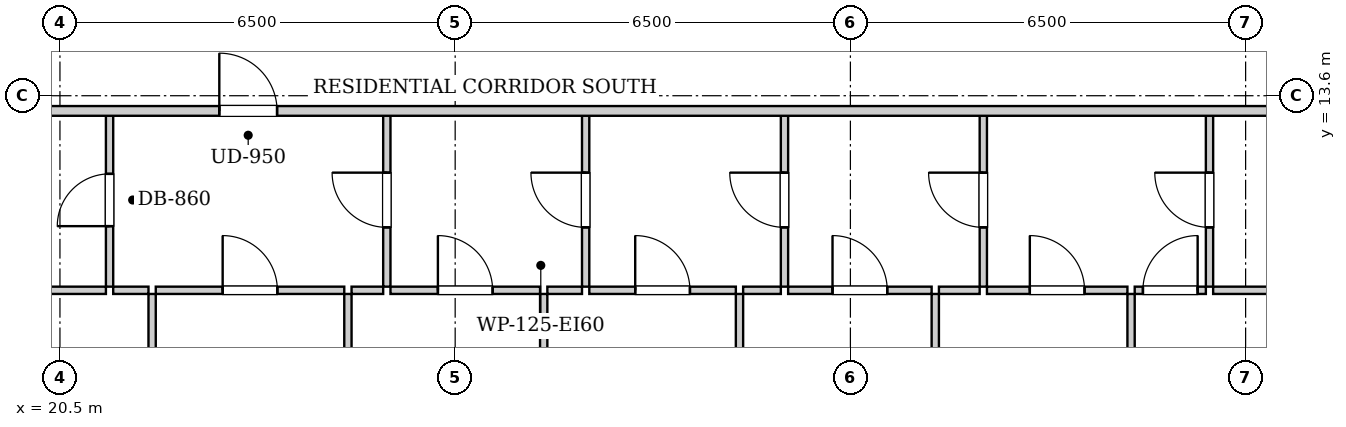
"""IFC4 building model, lengths in metres.
Left out: names, types, materials, properties, quantities, classifications, styles, units other than length and angle.
Written with IfcOpenShell. Run it as: python <this file> out.ifc"""

import sys

from ifc_helpers import new_model, si_unit, direction, frame, frame_2d, origin, place, context, subcontext, project, spatial, rectangle, extrude, element, fill, save


model = new_model("IFC4")
c1 = context("Model", 3, precision=1e-05, world=origin(), true_north=direction((0.0, 1.0)))
c2 = subcontext(c1, "Body", "Model", "MODEL_VIEW")
j1 = project(units=[si_unit("LENGTHUNIT", "METRE"), si_unit("PLANEANGLEUNIT", "RADIAN")], contexts=[c1])
p1 = place(None, origin())
s1 = spatial("IfcSite", under=j1, at=p1, CompositionType="ELEMENT")
p2 = place(p1, origin())
s2 = spatial("IfcBuilding", under=s1, at=p2, CompositionType="ELEMENT")
p3 = place(p2, frame((0.0, 0.0, 61.0)))
s3 = spatial("IfcBuildingStorey", under=s2, at=p3, CompositionType="ELEMENT", Elevation=61.0)
p4 = place(p3, frame((21.316, 10.46, 0.0), z_axis=(0.0, 0.0, 1.0), x_axis=(0.0, 1.0, 0.0)))
e1 = element("IfcWall", 1, at=p4, inside=s3, PredefinedType="PARTITIONING", context=c2, shape_type="SweptSolid", body=[
    extrude(rectangle(XDim=2.85, YDim=0.12, at=frame_2d((1.425, 0.0))), origin(), (0.0, 0.0, 1.0), 2.94),
])
p5 = place(p4, frame((0.995, 0.0, 0.0)))
e2 = element("IfcOpeningElement", 2, at=p5, cuts=e1, PredefinedType="OPENING", context=c2, shape_type="SweptSolid", body=[
    extrude(rectangle(XDim=0.86, YDim=2.05, at=frame_2d((0.43, 1.025))), frame((0.0, 0.07, 0.0), z_axis=(0.0, -1.0, 0.0), x_axis=(1.0, 0.0, 0.0)), (0.0, 0.0, 1.0), 0.14),
])
p6 = place(p3, frame((18.856, 10.4, 0.0), z_axis=(0.0, 0.0, 1.0), x_axis=(1.0, 0.0, 0.0)))
e3 = element("IfcWall", 3, at=p6, inside=s3, PredefinedType="PARTITIONING", context=c2, shape_type="SweptSolid", body=[
    extrude(rectangle(XDim=2.4, YDim=0.12, at=frame_2d((1.2, 0.0))), origin(), (0.0, 0.0, 1.0), 2.94),
])
p7 = place(p3, frame((25.876, 10.46, 0.0), z_axis=(0.0, 0.0, 1.0), x_axis=(0.0, 1.0, 0.0)))
e4 = element("IfcWall", 4, at=p7, inside=s3, PredefinedType="PARTITIONING", context=c2, shape_type="SweptSolid", body=[
    extrude(rectangle(XDim=2.85, YDim=0.12, at=frame_2d((1.425, 0.0))), origin(), (0.0, 0.0, 1.0), 2.94),
])
p8 = place(p7, frame((0.975, 0.0, 0.0)))
e5 = element("IfcOpeningElement", 5, at=p8, cuts=e4, PredefinedType="OPENING", context=c2, shape_type="SweptSolid", body=[
    extrude(rectangle(XDim=0.9, YDim=2.05, at=frame_2d((0.45, 1.025))), frame((0.0, 0.07, 0.0), z_axis=(0.0, -1.0, 0.0), x_axis=(1.0, 0.0, 0.0)), (0.0, 0.0, 1.0), 0.14),
])
p9 = place(p3, frame((21.376, 10.4, 0.0), z_axis=(0.0, 0.0, 1.0), x_axis=(1.0, 0.0, 0.0)))
e6 = element("IfcWall", 6, at=p9, inside=s3, PredefinedType="PARTITIONING", context=c2, shape_type="SweptSolid", body=[
    extrude(rectangle(XDim=0.58, YDim=0.12, at=frame_2d((0.29, 0.0))), origin(), (0.0, 0.0, 1.0), 2.94),
])
p10 = place(p3, frame((22.076, 10.4, 0.0), z_axis=(0.0, 0.0, 1.0), x_axis=(1.0, 0.0, 0.0)))
e7 = element("IfcWall", 7, at=p10, inside=s3, PredefinedType="PARTITIONING", context=c2, shape_type="SweptSolid", body=[
    extrude(rectangle(XDim=3.1, YDim=0.12, at=frame_2d((1.55, 0.0))), origin(), (0.0, 0.0, 1.0), 2.94),
])
p11 = place(p10, frame((1.1, 0.0, 0.0)))
e8 = element("IfcOpeningElement", 8, at=p11, cuts=e7, PredefinedType="OPENING", context=c2, shape_type="SweptSolid", body=[
    extrude(rectangle(XDim=0.9, YDim=2.05, at=frame_2d((0.45, 1.025))), frame((0.0, 0.07, 0.0), z_axis=(0.0, -1.0, 0.0), x_axis=(1.0, 0.0, 0.0)), (0.0, 0.0, 1.0), 0.14),
])
p12 = place(p3, frame((25.296, 10.4, 0.0), z_axis=(0.0, 0.0, 1.0), x_axis=(1.0, 0.0, 0.0)))
e9 = element("IfcWall", 9, at=p12, inside=s3, PredefinedType="PARTITIONING", context=c2, shape_type="SweptSolid", body=[
    extrude(rectangle(XDim=0.52, YDim=0.12, at=frame_2d((0.26, 0.0))), origin(), (0.0, 0.0, 1.0), 2.94),
])
p13 = place(p3, frame((29.146, 10.46, 0.0), z_axis=(0.0, 0.0, 1.0), x_axis=(0.0, 1.0, 0.0)))
e10 = element("IfcWall", 10, at=p13, inside=s3, PredefinedType="PARTITIONING", context=c2, shape_type="SweptSolid", body=[
    extrude(rectangle(XDim=2.85, YDim=0.12, at=frame_2d((1.425, 0.0))), origin(), (0.0, 0.0, 1.0), 2.94),
])
p14 = place(p13, frame((0.975, 0.0, 0.0)))
e11 = element("IfcOpeningElement", 11, at=p14, cuts=e10, PredefinedType="OPENING", context=c2, shape_type="SweptSolid", body=[
    extrude(rectangle(XDim=0.9, YDim=2.05, at=frame_2d((0.45, 1.025))), frame((0.0, 0.07, 0.0), z_axis=(0.0, -1.0, 0.0), x_axis=(1.0, 0.0, 0.0)), (0.0, 0.0, 1.0), 0.14),
])
p15 = place(p3, frame((25.936, 10.4, 0.0), z_axis=(0.0, 0.0, 1.0), x_axis=(1.0, 0.0, 0.0)))
e12 = element("IfcWall", 12, at=p15, inside=s3, PredefinedType="PARTITIONING", context=c2, shape_type="SweptSolid", body=[
    extrude(rectangle(XDim=2.46, YDim=0.12, at=frame_2d((1.23, 0.0))), origin(), (0.0, 0.0, 1.0), 2.94),
])
p16 = place(p15, frame((0.78, 0.0, 0.0)))
e13 = element("IfcOpeningElement", 13, at=p16, cuts=e12, PredefinedType="OPENING", context=c2, shape_type="SweptSolid", body=[
    extrude(rectangle(XDim=0.9, YDim=2.05, at=frame_2d((0.45, 1.025))), frame((0.0, 0.07, 0.0), z_axis=(0.0, -1.0, 0.0), x_axis=(1.0, 0.0, 0.0)), (0.0, 0.0, 1.0), 0.14),
])
p17 = place(p3, frame((28.516, 10.4, 0.0), z_axis=(0.0, 0.0, 1.0), x_axis=(1.0, 0.0, 0.0)))
e14 = element("IfcWall", 14, at=p17, inside=s3, PredefinedType="PARTITIONING", context=c2, shape_type="SweptSolid", body=[
    extrude(rectangle(XDim=0.57, YDim=0.12, at=frame_2d((0.285, 0.0))), origin(), (0.0, 0.0, 1.0), 2.94),
])
p18 = place(p3, frame((32.416, 10.46, 0.0), z_axis=(0.0, 0.0, 1.0), x_axis=(0.0, 1.0, 0.0)))
e15 = element("IfcWall", 15, at=p18, inside=s3, PredefinedType="PARTITIONING", context=c2, shape_type="SweptSolid", body=[
    extrude(rectangle(XDim=2.85, YDim=0.12, at=frame_2d((1.425, 0.0))), origin(), (0.0, 0.0, 1.0), 2.94),
])
p19 = place(p18, frame((0.975, 0.0, 0.0)))
e16 = element("IfcOpeningElement", 16, at=p19, cuts=e15, PredefinedType="OPENING", context=c2, shape_type="SweptSolid", body=[
    extrude(rectangle(XDim=0.9, YDim=2.05, at=frame_2d((0.45, 1.025))), frame((0.0, 0.07, 0.0), z_axis=(0.0, -1.0, 0.0), x_axis=(1.0, 0.0, 0.0)), (0.0, 0.0, 1.0), 0.14),
])
p20 = place(p3, frame((29.206, 10.4, 0.0), z_axis=(0.0, 0.0, 1.0), x_axis=(1.0, 0.0, 0.0)))
e17 = element("IfcWall", 17, at=p20, inside=s3, PredefinedType="PARTITIONING", context=c2, shape_type="SweptSolid", body=[
    extrude(rectangle(XDim=2.41, YDim=0.12, at=frame_2d((1.205, 0.0))), origin(), (0.0, 0.0, 1.0), 2.94),
])
p21 = place(p20, frame((0.755, 0.0, 0.0)))
e18 = element("IfcOpeningElement", 18, at=p21, cuts=e17, PredefinedType="OPENING", context=c2, shape_type="SweptSolid", body=[
    extrude(rectangle(XDim=0.9, YDim=2.05, at=frame_2d((0.45, 1.025))), frame((0.0, 0.07, 0.0), z_axis=(0.0, -1.0, 0.0), x_axis=(1.0, 0.0, 0.0)), (0.0, 0.0, 1.0), 0.14),
])
p22 = place(p3, frame((31.736, 10.4, 0.0), z_axis=(0.0, 0.0, 1.0), x_axis=(1.0, 0.0, 0.0)))
e19 = element("IfcWall", 19, at=p22, inside=s3, PredefinedType="PARTITIONING", context=c2, shape_type="SweptSolid", body=[
    extrude(rectangle(XDim=0.62, YDim=0.12, at=frame_2d((0.31, 0.0))), origin(), (0.0, 0.0, 1.0), 2.94),
])
p23 = place(p3, frame((35.686, 10.46, 0.0), z_axis=(0.0, 0.0, 1.0), x_axis=(0.0, 1.0, 0.0)))
e20 = element("IfcWall", 20, at=p23, inside=s3, PredefinedType="PARTITIONING", context=c2, shape_type="SweptSolid", body=[
    extrude(rectangle(XDim=2.85, YDim=0.12, at=frame_2d((1.425, 0.0))), origin(), (0.0, 0.0, 1.0), 2.94),
])
p24 = place(p23, frame((0.975, 0.0, 0.0)))
e21 = element("IfcOpeningElement", 21, at=p24, cuts=e20, PredefinedType="OPENING", context=c2, shape_type="SweptSolid", body=[
    extrude(rectangle(XDim=0.9, YDim=2.05, at=frame_2d((0.45, 1.025))), frame((0.0, 0.07, 0.0), z_axis=(0.0, -1.0, 0.0), x_axis=(1.0, 0.0, 0.0)), (0.0, 0.0, 1.0), 0.14),
])
p25 = place(p3, frame((32.476, 10.4, 0.0), z_axis=(0.0, 0.0, 1.0), x_axis=(1.0, 0.0, 0.0)))
e22 = element("IfcWall", 22, at=p25, inside=s3, PredefinedType="PARTITIONING", context=c2, shape_type="SweptSolid", body=[
    extrude(rectangle(XDim=2.36, YDim=0.12, at=frame_2d((1.18, 0.0))), origin(), (0.0, 0.0, 1.0), 2.94),
])
p26 = place(p25, frame((0.73, 0.0, 0.0)))
e23 = element("IfcOpeningElement", 23, at=p26, cuts=e22, PredefinedType="OPENING", context=c2, shape_type="SweptSolid", body=[
    extrude(rectangle(XDim=0.9, YDim=2.05, at=frame_2d((0.45, 1.025))), frame((0.0, 0.07, 0.0), z_axis=(0.0, -1.0, 0.0), x_axis=(1.0, 0.0, 0.0)), (0.0, 0.0, 1.0), 0.14),
])
p27 = place(p3, frame((34.956, 10.4, 0.0), z_axis=(0.0, 0.0, 1.0), x_axis=(1.0, 0.0, 0.0)))
e24 = element("IfcWall", 24, at=p27, inside=s3, PredefinedType="PARTITIONING", context=c2, shape_type="SweptSolid", body=[
    extrude(rectangle(XDim=0.67, YDim=0.12, at=frame_2d((0.335, 0.0))), origin(), (0.0, 0.0, 1.0), 2.94),
])
p28 = place(p3, frame((39.406, 10.46, 0.0), z_axis=(0.0, 0.0, 1.0), x_axis=(0.0, 1.0, 0.0)))
e25 = element("IfcWall", 25, at=p28, inside=s3, PredefinedType="PARTITIONING", context=c2, shape_type="SweptSolid", body=[
    extrude(rectangle(XDim=2.85, YDim=0.12, at=frame_2d((1.425, 0.0))), origin(), (0.0, 0.0, 1.0), 2.94),
])
p29 = place(p28, frame((0.975, 0.0, 0.0)))
e26 = element("IfcOpeningElement", 26, at=p29, cuts=e25, PredefinedType="OPENING", context=c2, shape_type="SweptSolid", body=[
    extrude(rectangle(XDim=0.9, YDim=2.05, at=frame_2d((0.45, 1.025))), frame((0.0, 0.07, 0.0), z_axis=(0.0, -1.0, 0.0), x_axis=(1.0, 0.0, 0.0)), (0.0, 0.0, 1.0), 0.14),
])
p30 = place(p3, frame((35.746, 10.4, 0.0), z_axis=(0.0, 0.0, 1.0), x_axis=(1.0, 0.0, 0.0)))
e27 = element("IfcWall", 27, at=p30, inside=s3, PredefinedType="PARTITIONING", context=c2, shape_type="SweptSolid", body=[
    extrude(rectangle(XDim=2.31, YDim=0.12, at=frame_2d((1.155, 0.0))), origin(), (0.0, 0.0, 1.0), 2.94),
])
p31 = place(p30, frame((0.705, 0.0, 0.0)))
e28 = element("IfcOpeningElement", 28, at=p31, cuts=e27, PredefinedType="OPENING", context=c2, shape_type="SweptSolid", body=[
    extrude(rectangle(XDim=0.9, YDim=2.05, at=frame_2d((0.45, 1.025))), frame((0.0, 0.07, 0.0), z_axis=(0.0, -1.0, 0.0), x_axis=(1.0, 0.0, 0.0)), (0.0, 0.0, 1.0), 0.14),
])
p32 = place(p3, frame((38.176, 10.4, 0.0), z_axis=(0.0, 0.0, 1.0), x_axis=(1.0, 0.0, 0.0)))
e29 = element("IfcWall", 29, at=p32, inside=s3, PredefinedType="PARTITIONING", context=c2, shape_type="SweptSolid", body=[
    extrude(rectangle(XDim=1.17, YDim=0.12, at=frame_2d((0.585, 0.0))), origin(), (0.0, 0.0, 1.0), 2.94),
])
p33 = place(p32, frame((0.135, 0.0, 0.0)))
e30 = element("IfcOpeningElement", 30, at=p33, cuts=e29, PredefinedType="OPENING", context=c2, shape_type="SweptSolid", body=[
    extrude(rectangle(XDim=0.9, YDim=2.05, at=frame_2d((0.45, 1.025))), frame((0.0, 0.07, 0.0), z_axis=(0.0, -1.0, 0.0), x_axis=(1.0, 0.0, 0.0)), (0.0, 0.0, 1.0), 0.14),
])
p34 = place(p3, frame((39.466, 10.4, 0.0), z_axis=(0.0, 0.0, 1.0), x_axis=(1.0, 0.0, 0.0)))
e31 = element("IfcWall", 31, at=p34, inside=s3, PredefinedType="PARTITIONING", context=c2, shape_type="SweptSolid", body=[
    extrude(rectangle(XDim=4.024, YDim=0.12, at=frame_2d((2.012, 0.0))), origin(), (0.0, 0.0, 1.0), 2.94),
])
p35 = place(p34, frame((1.562, 0.0, 0.0)))
e32 = element("IfcOpeningElement", 32, at=p35, cuts=e31, PredefinedType="OPENING", context=c2, shape_type="SweptSolid", body=[
    extrude(rectangle(XDim=0.9, YDim=2.05, at=frame_2d((0.45, 1.025))), frame((0.0, 0.07, 0.0), z_axis=(0.0, -1.0, 0.0), x_axis=(1.0, 0.0, 0.0)), (0.0, 0.0, 1.0), 0.14),
])
p36 = place(p3, frame((22.016, 0.28, 0.0), z_axis=(0.0, 0.0, 1.0), x_axis=(0.0, 1.0, 0.0)))
e33 = element("IfcWall", 33, at=p36, inside=s3, PredefinedType="PARTITIONING", context=c2, shape_type="SweptSolid", body=[
    extrude(rectangle(XDim=10.06, YDim=0.12, at=frame_2d((5.03, 0.0))), origin(), (0.0, 0.0, 1.0), 2.94),
])
p37 = place(p36, frame((4.565, 0.0, 0.0)))
e34 = element("IfcOpeningElement", 34, at=p37, cuts=e33, PredefinedType="OPENING", context=c2, shape_type="SweptSolid", body=[
    extrude(rectangle(XDim=0.9, YDim=2.05, at=frame_2d((0.45, 1.025))), frame((0.0, 0.07, 0.0), z_axis=(0.0, -1.0, 0.0), x_axis=(1.0, 0.0, 0.0)), (0.0, 0.0, 1.0), 0.14),
])
p38 = place(p3, frame((25.236, 0.28, 0.0), z_axis=(0.0, 0.0, 1.0), x_axis=(0.0, 1.0, 0.0)))
e35 = element("IfcWall", 35, at=p38, inside=s3, PredefinedType="PARTITIONING", context=c2, shape_type="SweptSolid", body=[
    extrude(rectangle(XDim=10.06, YDim=0.12, at=frame_2d((5.03, 0.0))), origin(), (0.0, 0.0, 1.0), 2.94),
])
p39 = place(p38, frame((4.565, 0.0, 0.0)))
e36 = element("IfcOpeningElement", 36, at=p39, cuts=e35, PredefinedType="OPENING", context=c2, shape_type="SweptSolid", body=[
    extrude(rectangle(XDim=0.9, YDim=2.05, at=frame_2d((0.45, 1.025))), frame((0.0, 0.07, 0.0), z_axis=(0.0, -1.0, 0.0), x_axis=(1.0, 0.0, 0.0)), (0.0, 0.0, 1.0), 0.14),
])
p40 = place(p3, frame((28.456, 0.28, 0.0), z_axis=(0.0, 0.0, 1.0), x_axis=(0.0, 1.0, 0.0)))
e37 = element("IfcWall", 37, at=p40, inside=s3, PredefinedType="PARTITIONING", context=c2, shape_type="SweptSolid", body=[
    extrude(rectangle(XDim=10.06, YDim=0.12, at=frame_2d((5.03, 0.0))), origin(), (0.0, 0.0, 1.0), 2.94),
])
p41 = place(p40, frame((4.565, 0.0, 0.0)))
e38 = element("IfcOpeningElement", 38, at=p41, cuts=e37, PredefinedType="OPENING", context=c2, shape_type="SweptSolid", body=[
    extrude(rectangle(XDim=0.9, YDim=2.05, at=frame_2d((0.45, 1.025))), frame((0.0, 0.07, 0.0), z_axis=(0.0, -1.0, 0.0), x_axis=(1.0, 0.0, 0.0)), (0.0, 0.0, 1.0), 0.14),
])
p42 = place(p3, frame((31.676, 0.28, 0.0), z_axis=(0.0, 0.0, 1.0), x_axis=(0.0, 1.0, 0.0)))
e39 = element("IfcWall", 39, at=p42, inside=s3, PredefinedType="PARTITIONING", context=c2, shape_type="SweptSolid", body=[
    extrude(rectangle(XDim=10.06, YDim=0.12, at=frame_2d((5.03, 0.0))), origin(), (0.0, 0.0, 1.0), 2.94),
])
p43 = place(p42, frame((4.565, 0.0, 0.0)))
e40 = element("IfcOpeningElement", 40, at=p43, cuts=e39, PredefinedType="OPENING", context=c2, shape_type="SweptSolid", body=[
    extrude(rectangle(XDim=0.9, YDim=2.05, at=frame_2d((0.45, 1.025))), frame((0.0, 0.07, 0.0), z_axis=(0.0, -1.0, 0.0), x_axis=(1.0, 0.0, 0.0)), (0.0, 0.0, 1.0), 0.14),
])
p44 = place(p3, frame((34.896, 0.28, 0.0), z_axis=(0.0, 0.0, 1.0), x_axis=(0.0, 1.0, 0.0)))
e41 = element("IfcWall", 41, at=p44, inside=s3, PredefinedType="PARTITIONING", context=c2, shape_type="SweptSolid", body=[
    extrude(rectangle(XDim=10.06, YDim=0.12, at=frame_2d((5.03, 0.0))), origin(), (0.0, 0.0, 1.0), 2.94),
])
p45 = place(p44, frame((4.565, 0.0, 0.0)))
e42 = element("IfcOpeningElement", 42, at=p45, cuts=e41, PredefinedType="OPENING", context=c2, shape_type="SweptSolid", body=[
    extrude(rectangle(XDim=0.9, YDim=2.05, at=frame_2d((0.45, 1.025))), frame((0.0, 0.07, 0.0), z_axis=(0.0, -1.0, 0.0), x_axis=(1.0, 0.0, 0.0)), (0.0, 0.0, 1.0), 0.14),
])
p46 = place(p3, frame((38.116, 0.28, 0.0), z_axis=(0.0, 0.0, 1.0), x_axis=(0.0, 1.0, 0.0)))
e43 = element("IfcWall", 43, at=p46, inside=s3, PredefinedType="PARTITIONING", context=c2, shape_type="SweptSolid", body=[
    extrude(rectangle(XDim=10.06, YDim=0.12, at=frame_2d((5.03, 0.0))), origin(), (0.0, 0.0, 1.0), 2.94),
])
p47 = place(p46, frame((4.565, 0.0, 0.0)))
e44 = element("IfcOpeningElement", 44, at=p47, cuts=e43, PredefinedType="OPENING", context=c2, shape_type="SweptSolid", body=[
    extrude(rectangle(XDim=0.9, YDim=2.05, at=frame_2d((0.45, 1.025))), frame((0.0, 0.07, 0.0), z_axis=(0.0, -1.0, 0.0), x_axis=(1.0, 0.0, 0.0)), (0.0, 0.0, 1.0), 0.14),
])
p48 = place(p3, frame((10.05, 13.35, 0.0), z_axis=(0.0, 0.0, 1.0), x_axis=(1.0, 0.0, 0.0)))
e45 = element("IfcWall", 45, at=p48, inside=s3, PredefinedType="PARTITIONING", context=c2, shape_type="SweptSolid", body=[
    extrude(rectangle(XDim=33.9, YDim=0.16, at=frame_2d((16.95, 0.0))), origin(), (0.0, 0.0, 1.0), 2.94),
])
p49 = place(p48, frame((3.8, 0.0, 0.0)))
e46 = element("IfcOpeningElement", 46, at=p49, cuts=e45, PredefinedType="OPENING", context=c2, shape_type="SweptSolid", body=[
    extrude(rectangle(XDim=0.95, YDim=2.1, at=frame_2d((0.475, 1.05))), frame((0.0, 0.09, 0.0), z_axis=(0.0, -1.0, 0.0), x_axis=(1.0, 0.0, 0.0)), (0.0, 0.0, 1.0), 0.18),
])
p50 = place(p48, frame((13.071, 0.0, 0.0)))
e47 = element("IfcOpeningElement", 47, at=p50, cuts=e45, PredefinedType="OPENING", context=c2, shape_type="SweptSolid", body=[
    extrude(rectangle(XDim=0.95, YDim=2.1, at=frame_2d((0.475, 1.05))), frame((0.0, 0.09, 0.0), z_axis=(0.0, -1.0, 0.0), x_axis=(1.0, 0.0, 0.0)), (0.0, 0.0, 1.0), 0.18),
])
p51 = place(p5, origin())
e48 = element("IfcDoor", 48, at=p51, inside=s3, OperationType="SINGLE_SWING_LEFT", PredefinedType="DOOR", context=c2, shape_type="SweptSolid", body=[
    extrude(rectangle(XDim=0.86, YDim=2.05, at=frame_2d((0.43, 1.025))), frame((0.0, 0.025, 0.0), z_axis=(0.0, -1.0, 0.0), x_axis=(1.0, 0.0, 0.0)), (0.0, 0.0, 1.0), 0.05),
])
fill(e2, e48)
p52 = place(p8, origin())
e49 = element("IfcDoor", 49, at=p52, inside=s3, OperationType="SINGLE_SWING_RIGHT", PredefinedType="DOOR", context=c2, shape_type="SweptSolid", body=[
    extrude(rectangle(XDim=0.9, YDim=2.05, at=frame_2d((0.45, 1.025))), frame((0.0, 0.025, 0.0), z_axis=(0.0, -1.0, 0.0), x_axis=(1.0, 0.0, 0.0)), (0.0, 0.0, 1.0), 0.05),
])
fill(e5, e49)
p53 = place(p11, origin())
e50 = element("IfcDoor", 50, at=p53, inside=s3, OperationType="SINGLE_SWING_LEFT", PredefinedType="DOOR", context=c2, shape_type="SweptSolid", body=[
    extrude(rectangle(XDim=0.9, YDim=2.05, at=frame_2d((0.45, 1.025))), frame((0.0, 0.025, 0.0), z_axis=(0.0, -1.0, 0.0), x_axis=(1.0, 0.0, 0.0)), (0.0, 0.0, 1.0), 0.05),
])
fill(e8, e50)
p54 = place(p14, origin())
e51 = element("IfcDoor", 51, at=p54, inside=s3, OperationType="SINGLE_SWING_RIGHT", PredefinedType="DOOR", context=c2, shape_type="SweptSolid", body=[
    extrude(rectangle(XDim=0.9, YDim=2.05, at=frame_2d((0.45, 1.025))), frame((0.0, 0.025, 0.0), z_axis=(0.0, -1.0, 0.0), x_axis=(1.0, 0.0, 0.0)), (0.0, 0.0, 1.0), 0.05),
])
fill(e11, e51)
p55 = place(p16, origin())
e52 = element("IfcDoor", 52, at=p55, inside=s3, OperationType="SINGLE_SWING_LEFT", PredefinedType="DOOR", context=c2, shape_type="SweptSolid", body=[
    extrude(rectangle(XDim=0.9, YDim=2.05, at=frame_2d((0.45, 1.025))), frame((0.0, 0.025, 0.0), z_axis=(0.0, -1.0, 0.0), x_axis=(1.0, 0.0, 0.0)), (0.0, 0.0, 1.0), 0.05),
])
fill(e13, e52)
p56 = place(p19, origin())
e53 = element("IfcDoor", 53, at=p56, inside=s3, OperationType="SINGLE_SWING_RIGHT", PredefinedType="DOOR", context=c2, shape_type="SweptSolid", body=[
    extrude(rectangle(XDim=0.9, YDim=2.05, at=frame_2d((0.45, 1.025))), frame((0.0, 0.025, 0.0), z_axis=(0.0, -1.0, 0.0), x_axis=(1.0, 0.0, 0.0)), (0.0, 0.0, 1.0), 0.05),
])
fill(e16, e53)
p57 = place(p21, origin())
e54 = element("IfcDoor", 54, at=p57, inside=s3, OperationType="SINGLE_SWING_LEFT", PredefinedType="DOOR", context=c2, shape_type="SweptSolid", body=[
    extrude(rectangle(XDim=0.9, YDim=2.05, at=frame_2d((0.45, 1.025))), frame((0.0, 0.025, 0.0), z_axis=(0.0, -1.0, 0.0), x_axis=(1.0, 0.0, 0.0)), (0.0, 0.0, 1.0), 0.05),
])
fill(e18, e54)
p58 = place(p24, origin())
e55 = element("IfcDoor", 55, at=p58, inside=s3, OperationType="SINGLE_SWING_RIGHT", PredefinedType="DOOR", context=c2, shape_type="SweptSolid", body=[
    extrude(rectangle(XDim=0.9, YDim=2.05, at=frame_2d((0.45, 1.025))), frame((0.0, 0.025, 0.0), z_axis=(0.0, -1.0, 0.0), x_axis=(1.0, 0.0, 0.0)), (0.0, 0.0, 1.0), 0.05),
])
fill(e21, e55)
p59 = place(p26, origin())
e56 = element("IfcDoor", 56, at=p59, inside=s3, OperationType="SINGLE_SWING_LEFT", PredefinedType="DOOR", context=c2, shape_type="SweptSolid", body=[
    extrude(rectangle(XDim=0.9, YDim=2.05, at=frame_2d((0.45, 1.025))), frame((0.0, 0.025, 0.0), z_axis=(0.0, -1.0, 0.0), x_axis=(1.0, 0.0, 0.0)), (0.0, 0.0, 1.0), 0.05),
])
fill(e23, e56)
p60 = place(p29, origin())
e57 = element("IfcDoor", 57, at=p60, inside=s3, OperationType="SINGLE_SWING_RIGHT", PredefinedType="DOOR", context=c2, shape_type="SweptSolid", body=[
    extrude(rectangle(XDim=0.9, YDim=2.05, at=frame_2d((0.45, 1.025))), frame((0.0, 0.025, 0.0), z_axis=(0.0, -1.0, 0.0), x_axis=(1.0, 0.0, 0.0)), (0.0, 0.0, 1.0), 0.05),
])
fill(e26, e57)
p61 = place(p31, origin())
e58 = element("IfcDoor", 58, at=p61, inside=s3, OperationType="SINGLE_SWING_LEFT", PredefinedType="DOOR", context=c2, shape_type="SweptSolid", body=[
    extrude(rectangle(XDim=0.9, YDim=2.05, at=frame_2d((0.45, 1.025))), frame((0.0, 0.025, 0.0), z_axis=(0.0, -1.0, 0.0), x_axis=(1.0, 0.0, 0.0)), (0.0, 0.0, 1.0), 0.05),
])
fill(e28, e58)
p62 = place(p33, origin())
e59 = element("IfcDoor", 59, at=p62, inside=s3, OperationType="SINGLE_SWING_RIGHT", PredefinedType="DOOR", context=c2, shape_type="SweptSolid", body=[
    extrude(rectangle(XDim=0.9, YDim=2.05, at=frame_2d((0.45, 1.025))), frame((0.0, 0.025, 0.0), z_axis=(0.0, -1.0, 0.0), x_axis=(1.0, 0.0, 0.0)), (0.0, 0.0, 1.0), 0.05),
])
fill(e30, e59)
p63 = place(p50, origin())
e60 = element("IfcDoor", 60, at=p63, inside=s3, OperationType="SINGLE_SWING_LEFT", PredefinedType="DOOR", context=c2, shape_type="SweptSolid", body=[
    extrude(rectangle(XDim=0.95, YDim=2.1, at=frame_2d((0.475, 1.05))), frame((0.0, 0.025, 0.0), z_axis=(0.0, -1.0, 0.0), x_axis=(1.0, 0.0, 0.0)), (0.0, 0.0, 1.0), 0.05),
])
fill(e47, e60)
save(model, sys.argv[1])
